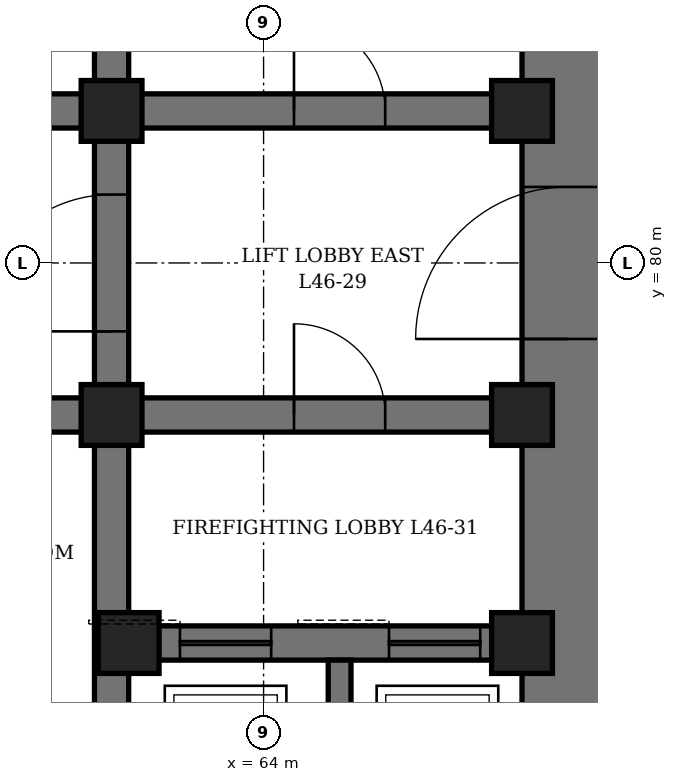
"""IFC4 building model, lengths in metres.
Left out: names, types, materials, properties, quantities, classifications, styles, units other than length and angle.
Written with IfcOpenShell. Run it as: python <this file> out.ifc"""

import sys

from ifc_helpers import new_model, si_unit, direction, frame, frame_2d, origin, origin_2d, place, context, subcontext, project, spatial, rectangle, hollow_rectangle, extrude, element, fill, save


model = new_model("IFC4")
c1 = context("Model", 3, precision=1e-05, world=origin(), true_north=direction((0.0, 1.0)))
c2 = subcontext(c1, "Body", "Model", "MODEL_VIEW")
j1 = project(units=[si_unit("LENGTHUNIT", "METRE"), si_unit("PLANEANGLEUNIT", "RADIAN")], contexts=[c1])
p1 = place(None, origin())
s1 = spatial("IfcSite", under=j1, at=p1, CompositionType="ELEMENT")
p2 = place(p1, origin())
s2 = spatial("IfcBuilding", under=s1, at=p2, CompositionType="ELEMENT")
p3 = place(p2, frame((0.0, 0.0, 206.5)))
s3 = spatial("IfcBuildingStorey", under=s2, at=p3, CompositionType="ELEMENT", Elevation=206.5)
p4 = place(p3, frame((68.0, 70.4, 0.0), z_axis=(0.0, 0.0, 1.0), x_axis=(0.0, 1.0, 0.0)))
e1 = element("IfcWall", 1, at=p4, inside=s3, PredefinedType="SHEAR", context=c2, shape_type="SweptSolid", body=[
    extrude(rectangle(XDim=19.2, YDim=1.2, at=frame_2d((9.6, 0.0))), origin(), (0.0, 0.0, 1.0), 4.2),
])
p5 = place(p4, frame((8.6, 0.0, 0.0)))
e2 = element("IfcOpeningElement", 2, at=p5, cuts=e1, PredefinedType="OPENING", context=c2, shape_type="SweptSolid", body=[
    extrude(rectangle(XDim=2.0, YDim=2.4, at=frame_2d((1.0, 1.2))), frame((0.0, 0.61, 0.0), z_axis=(0.0, -1.0, 0.0), x_axis=(1.0, 0.0, 0.0)), (0.0, 0.0, 1.0), 1.22),
])
p6 = place(p3, frame((62.0, 71.6, 0.0), z_axis=(0.0, 0.0, 1.0), x_axis=(0.0, 1.0, 0.0)))
e3 = element("IfcWall", 3, at=p6, inside=s3, PredefinedType="SHEAR", context=c2, shape_type="SweptSolid", body=[
    extrude(rectangle(XDim=16.8, YDim=0.45, at=frame_2d((8.4, 0.0))), origin(), (0.0, 0.0, 1.0), 4.2),
])
p7 = place(p6, frame((7.5, 0.0, 0.0)))
e4 = element("IfcOpeningElement", 4, at=p7, cuts=e3, PredefinedType="OPENING", context=c2, shape_type="SweptSolid", body=[
    extrude(rectangle(XDim=1.8, YDim=2.4, at=frame_2d((0.9, 1.2))), frame((0.0, 0.235, 0.0), z_axis=(0.0, -1.0, 0.0), x_axis=(1.0, 0.0, 0.0)), (0.0, 0.0, 1.0), 0.47),
])
p8 = place(p3, frame((62.225, 75.0, 0.0), z_axis=(0.0, 0.0, 1.0), x_axis=(1.0, 0.0, 0.0)))
e5 = element("IfcWall", 5, at=p8, inside=s3, PredefinedType="SHEAR", context=c2, shape_type="SweptSolid", body=[
    extrude(rectangle(XDim=5.175, YDim=0.45, at=frame_2d((2.587, 0.0))), origin(), (0.0, 0.0, 1.0), 4.2),
])
p9 = place(p8, frame((0.675, 0.0, 0.0)))
e6 = element("IfcOpeningElement", 6, at=p9, cuts=e5, PredefinedType="OPENING", context=c2, shape_type="SweptSolid", body=[
    extrude(rectangle(XDim=1.2, YDim=2.2, at=frame_2d((0.6, 1.1))), frame((0.0, 0.235, 0.0), z_axis=(0.0, -1.0, 0.0), x_axis=(1.0, 0.0, 0.0)), (0.0, 0.0, 1.0), 0.47),
])
p10 = place(p8, frame((3.425, 0.0, 0.0)))
e7 = element("IfcOpeningElement", 7, at=p10, cuts=e5, PredefinedType="OPENING", context=c2, shape_type="SweptSolid", body=[
    extrude(rectangle(XDim=1.2, YDim=2.2, at=frame_2d((0.6, 1.1))), frame((0.0, 0.235, 0.0), z_axis=(0.0, -1.0, 0.0), x_axis=(1.0, 0.0, 0.0)), (0.0, 0.0, 1.0), 0.47),
])
p11 = place(p3, frame((62.225, 78.0, 0.0), z_axis=(0.0, 0.0, 1.0), x_axis=(1.0, 0.0, 0.0)))
e8 = element("IfcWall", 8, at=p11, inside=s3, PredefinedType="SHEAR", context=c2, shape_type="SweptSolid", body=[
    extrude(rectangle(XDim=5.175, YDim=0.45, at=frame_2d((2.587, 0.0))), origin(), (0.0, 0.0, 1.0), 4.2),
])
p12 = place(p11, frame((2.175, 0.0, 0.0)))
e9 = element("IfcOpeningElement", 9, at=p12, cuts=e8, PredefinedType="OPENING", context=c2, shape_type="SweptSolid", body=[
    extrude(rectangle(XDim=1.2, YDim=2.1, at=frame_2d((0.6, 1.05))), frame((0.0, 0.235, 0.0), z_axis=(0.0, -1.0, 0.0), x_axis=(1.0, 0.0, 0.0)), (0.0, 0.0, 1.0), 0.47),
])
p13 = place(p3, frame((62.225, 82.0, 0.0), z_axis=(0.0, 0.0, 1.0), x_axis=(1.0, 0.0, 0.0)))
e10 = element("IfcWall", 10, at=p13, inside=s3, PredefinedType="SHEAR", context=c2, shape_type="SweptSolid", body=[
    extrude(rectangle(XDim=5.175, YDim=0.45, at=frame_2d((2.587, 0.0))), origin(), (0.0, 0.0, 1.0), 4.2),
])
p14 = place(p13, frame((2.175, 0.0, 0.0)))
e11 = element("IfcOpeningElement", 11, at=p14, cuts=e10, PredefinedType="OPENING", context=c2, shape_type="SweptSolid", body=[
    extrude(rectangle(XDim=1.2, YDim=2.1, at=frame_2d((0.6, 1.05))), frame((0.0, 0.235, 0.0), z_axis=(0.0, -1.0, 0.0), x_axis=(1.0, 0.0, 0.0)), (0.0, 0.0, 1.0), 0.47),
])
p15 = place(p3, frame((50.225, 78.0, 0.0), z_axis=(0.0, 0.0, 1.0), x_axis=(1.0, 0.0, 0.0)))
e12 = element("IfcWall", 12, at=p15, inside=s3, PredefinedType="SHEAR", context=c2, shape_type="SweptSolid", body=[
    extrude(rectangle(XDim=11.55, YDim=0.45, at=frame_2d((5.775, 0.0))), origin(), (0.0, 0.0, 1.0), 4.2),
])
p16 = place(p15, frame((0.825, 0.0, 0.0)))
e13 = element("IfcOpeningElement", 13, at=p16, cuts=e12, PredefinedType="OPENING", context=c2, shape_type="SweptSolid", body=[
    extrude(rectangle(XDim=0.9, YDim=2.1, at=frame_2d((0.45, 1.05))), frame((0.0, 0.235, 0.0), z_axis=(0.0, -1.0, 0.0), x_axis=(1.0, 0.0, 0.0)), (0.0, 0.0, 1.0), 0.47),
])
p17 = place(p15, frame((3.825, 0.0, 0.0)))
e14 = element("IfcOpeningElement", 14, at=p17, cuts=e12, PredefinedType="OPENING", context=c2, shape_type="SweptSolid", body=[
    extrude(rectangle(XDim=0.9, YDim=2.1, at=frame_2d((0.45, 1.05))), frame((0.0, 0.235, 0.0), z_axis=(0.0, -1.0, 0.0), x_axis=(1.0, 0.0, 0.0)), (0.0, 0.0, 1.0), 0.47),
])
p18 = place(p15, frame((6.825, 0.0, 0.0)))
e15 = element("IfcOpeningElement", 15, at=p18, cuts=e12, PredefinedType="OPENING", context=c2, shape_type="SweptSolid", body=[
    extrude(rectangle(XDim=0.9, YDim=2.1, at=frame_2d((0.45, 1.05))), frame((0.0, 0.235, 0.0), z_axis=(0.0, -1.0, 0.0), x_axis=(1.0, 0.0, 0.0)), (0.0, 0.0, 1.0), 0.47),
])
p19 = place(p15, frame((9.825, 0.0, 0.0)))
e16 = element("IfcOpeningElement", 16, at=p19, cuts=e12, PredefinedType="OPENING", context=c2, shape_type="SweptSolid", body=[
    extrude(rectangle(XDim=0.9, YDim=2.1, at=frame_2d((0.45, 1.05))), frame((0.0, 0.235, 0.0), z_axis=(0.0, -1.0, 0.0), x_axis=(1.0, 0.0, 0.0)), (0.0, 0.0, 1.0), 0.47),
])
p20 = place(p3, frame((50.225, 82.0, 0.0), z_axis=(0.0, 0.0, 1.0), x_axis=(1.0, 0.0, 0.0)))
e17 = element("IfcWall", 17, at=p20, inside=s3, PredefinedType="SHEAR", context=c2, shape_type="SweptSolid", body=[
    extrude(rectangle(XDim=11.55, YDim=0.45, at=frame_2d((5.775, 0.0))), origin(), (0.0, 0.0, 1.0), 4.2),
])
p21 = place(p20, frame((0.825, 0.0, 0.0)))
e18 = element("IfcOpeningElement", 18, at=p21, cuts=e17, PredefinedType="OPENING", context=c2, shape_type="SweptSolid", body=[
    extrude(rectangle(XDim=0.9, YDim=2.1, at=frame_2d((0.45, 1.05))), frame((0.0, 0.235, 0.0), z_axis=(0.0, -1.0, 0.0), x_axis=(1.0, 0.0, 0.0)), (0.0, 0.0, 1.0), 0.47),
])
p22 = place(p20, frame((3.825, 0.0, 0.0)))
e19 = element("IfcOpeningElement", 19, at=p22, cuts=e17, PredefinedType="OPENING", context=c2, shape_type="SweptSolid", body=[
    extrude(rectangle(XDim=0.9, YDim=2.1, at=frame_2d((0.45, 1.05))), frame((0.0, 0.235, 0.0), z_axis=(0.0, -1.0, 0.0), x_axis=(1.0, 0.0, 0.0)), (0.0, 0.0, 1.0), 0.47),
])
p23 = place(p20, frame((6.825, 0.0, 0.0)))
e20 = element("IfcOpeningElement", 20, at=p23, cuts=e17, PredefinedType="OPENING", context=c2, shape_type="SweptSolid", body=[
    extrude(rectangle(XDim=0.9, YDim=2.1, at=frame_2d((0.45, 1.05))), frame((0.0, 0.235, 0.0), z_axis=(0.0, -1.0, 0.0), x_axis=(1.0, 0.0, 0.0)), (0.0, 0.0, 1.0), 0.47),
])
p24 = place(p20, frame((9.825, 0.0, 0.0)))
e21 = element("IfcOpeningElement", 21, at=p24, cuts=e17, PredefinedType="OPENING", context=c2, shape_type="SweptSolid", body=[
    extrude(rectangle(XDim=0.9, YDim=2.1, at=frame_2d((0.45, 1.05))), frame((0.0, 0.235, 0.0), z_axis=(0.0, -1.0, 0.0), x_axis=(1.0, 0.0, 0.0)), (0.0, 0.0, 1.0), 0.47),
])
p25 = place(p3, frame((65.0, 71.6, 0.0), z_axis=(0.0, 0.0, 1.0), x_axis=(0.0, 1.0, 0.0)))
e22 = element("IfcWall", 22, at=p25, inside=s3, PredefinedType="SHEAR", context=c2, shape_type="SweptSolid", body=[
    extrude(rectangle(XDim=3.175, YDim=0.3, at=frame_2d((1.587, 0.0))), origin(), (0.0, 0.0, 1.0), 4.2),
])
for number, where, z_axis, x_axis in (
    (23, (62.0, 78.0, 0.0), (0.0, 0.0, 1.0), (1.0, 0.0, 0.0)),
    (24, (62.0, 82.0, 0.0), (0.0, 0.0, 1.0), (1.0, 0.0, 0.0)),
    (25, (62.225, 75.0, 0.0), (0.0, 0.0, 1.0), (1.0, 0.0, 0.0)),
    (26, (67.4, 75.0, 0.0), (0.0, 0.0, 1.0), (1.0, 0.0, 0.0)),
    (27, (67.4, 78.0, 0.0), (0.0, 0.0, 1.0), (1.0, 0.0, 0.0)),
    (28, (67.4, 82.0, 0.0), (0.0, 0.0, 1.0), (1.0, 0.0, 0.0)),
):
    element("IfcColumn", number, at=place(p3, frame(where, z_axis=z_axis, x_axis=x_axis)), inside=s3, PredefinedType="COLUMN", context=c2, shape_type="SweptSolid", body=[
        extrude(hollow_rectangle(XDim=0.8, YDim=0.8, WallThickness=0.1, at=origin_2d()), origin(), (0.0, 0.0, 1.0), 4.2),
    ])
p26 = place(p14, origin())
e29 = element("IfcDoor", 29, at=p26, inside=s3, OperationType="SINGLE_SWING_LEFT", PredefinedType="DOOR", context=c2, shape_type="SweptSolid", body=[
    extrude(rectangle(XDim=1.2, YDim=2.1, at=frame_2d((0.6, 1.05))), frame((0.0, 0.225, 0.0), z_axis=(0.0, -1.0, 0.0), x_axis=(1.0, 0.0, 0.0)), (0.0, 0.0, 1.0), 0.449),
])
fill(e11, e29)
p27 = place(p5, origin())
e30 = element("IfcDoor", 30, at=p27, inside=s3, OperationType="DOUBLE_DOOR_SINGLE_SWING", PredefinedType="DOOR", context=c2, shape_type="SweptSolid", body=[
    extrude(rectangle(XDim=2.0, YDim=2.4, at=frame_2d((1.0, 1.2))), frame((0.0, 0.35, 0.0), z_axis=(0.0, -1.0, 0.0), x_axis=(1.0, 0.0, 0.0)), (0.0, 0.0, 1.0), 0.7),
])
fill(e2, e30)
p28 = place(p7, origin())
e31 = element("IfcDoor", 31, at=p28, inside=s3, OperationType="DOUBLE_DOOR_SINGLE_SWING", PredefinedType="DOOR", context=c2, shape_type="SweptSolid", body=[
    extrude(rectangle(XDim=1.8, YDim=2.4, at=frame_2d((0.9, 1.2))), frame((0.0, 0.225, 0.0), z_axis=(0.0, -1.0, 0.0), x_axis=(1.0, 0.0, 0.0)), (0.0, 0.0, 1.0), 0.449),
])
fill(e4, e31)
p29 = place(p12, origin())
e32 = element("IfcDoor", 32, at=p29, inside=s3, OperationType="SINGLE_SWING_RIGHT", PredefinedType="DOOR", context=c2, shape_type="SweptSolid", body=[
    extrude(rectangle(XDim=1.2, YDim=2.1, at=frame_2d((0.6, 1.05))), frame((0.0, 0.225, 0.0), z_axis=(0.0, -1.0, 0.0), x_axis=(1.0, 0.0, 0.0)), (0.0, 0.0, 1.0), 0.449),
])
fill(e9, e32)
p30 = place(p9, origin())
e33 = element("IfcDoor", 33, at=p30, inside=s3, OperationType="SLIDING_TO_LEFT", PredefinedType="DOOR", context=c2, shape_type="SweptSolid", body=[
    extrude(rectangle(XDim=1.2, YDim=2.2, at=frame_2d((0.6, 1.1))), frame((0.0, 0.225, 0.0), z_axis=(0.0, -1.0, 0.0), x_axis=(1.0, 0.0, 0.0)), (0.0, 0.0, 1.0), 0.449),
])
fill(e6, e33)
p31 = place(p10, origin())
e34 = element("IfcDoor", 34, at=p31, inside=s3, OperationType="SLIDING_TO_LEFT", PredefinedType="DOOR", context=c2, shape_type="SweptSolid", body=[
    extrude(rectangle(XDim=1.2, YDim=2.2, at=frame_2d((0.6, 1.1))), frame((0.0, 0.225, 0.0), z_axis=(0.0, -1.0, 0.0), x_axis=(1.0, 0.0, 0.0)), (0.0, 0.0, 1.0), 0.449),
])
fill(e7, e34)
save(model, sys.argv[1])
